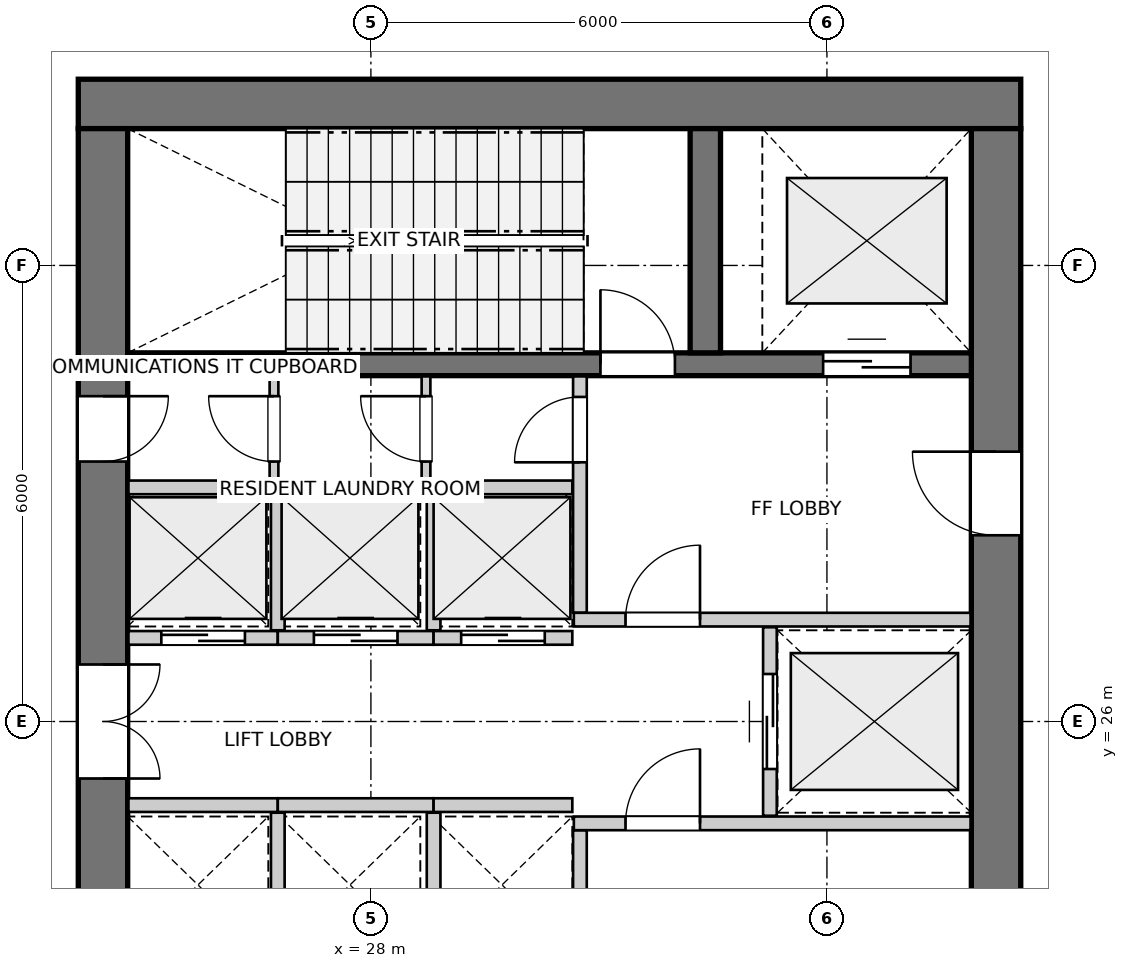
"""IFC4 building model, lengths in metres.
Left out: names, types, materials, properties, quantities, classifications, styles, units other than length and angle.
Written with IfcOpenShell. Run it as: python <this file> out.ifc"""

import sys

from ifc_helpers import new_model, si_unit, direction, frame, frame_2d, origin, place, context, subcontext, project, spatial, rectangle, extrude, source, transform, mapped, element, fill, save


model = new_model("IFC4")
c1 = context("Model", 3, precision=1e-05, world=origin(), true_north=direction((0.0, 1.0)))
c2 = subcontext(c1, "Body", "Model", "MODEL_VIEW")
j1 = project(units=[si_unit("LENGTHUNIT", "METRE"), si_unit("PLANEANGLEUNIT", "RADIAN")], contexts=[c1])
p1 = place(None, origin())
s1 = spatial("IfcSite", under=j1, at=p1, CompositionType="ELEMENT")
p2 = place(p1, origin())
s2 = spatial("IfcBuilding", under=s1, at=p2, CompositionType="ELEMENT")
p3 = place(p2, frame((0.0, 0.0, 128.0)))
s3 = spatial("IfcBuildingStorey", under=s2, at=p3, CompositionType="ELEMENT", Elevation=128.0)
p4 = place(p3, frame((36.55, 34.125, 0.0), z_axis=(0.0, 0.0, 1.0), x_axis=(-1.0, 0.0, 0.0)))
e1 = element("IfcWall", 1, at=p4, inside=s3, PredefinedType="SHEAR", context=c2, shape_type="SweptSolid", body=[
    extrude(rectangle(XDim=12.4, YDim=0.65, at=frame_2d((6.2, 0.0))), origin(), (0.0, 0.0, 1.0), 4.75),
])
p5 = place(p3, frame((24.475, 33.8, 0.0), z_axis=(0.0, 0.0, 1.0), x_axis=(0.0, -1.0, 0.0)))
e2 = element("IfcWall", 2, at=p5, inside=s3, PredefinedType="SHEAR", context=c2, shape_type="SweptSolid", body=[
    extrude(rectangle(XDim=15.6, YDim=0.65, at=frame_2d((7.8, 0.0))), origin(), (0.0, 0.0, 1.0), 4.75),
])
p6 = place(p5, frame((7.05, 0.0, 0.0)))
e3 = element("IfcOpeningElement", 3, at=p6, cuts=e2, PredefinedType="OPENING", context=c2, shape_type="SweptSolid", body=[
    extrude(rectangle(XDim=1.5, YDim=2.15, at=frame_2d((0.75, 1.075))), frame((0.0, 0.335, 0.0), z_axis=(0.0, -1.0, 0.0), x_axis=(1.0, 0.0, 0.0)), (0.0, 0.0, 1.0), 0.67),
])
p7 = place(p5, frame((3.52, 0.0, 0.0)))
e4 = element("IfcOpeningElement", 4, at=p7, cuts=e2, PredefinedType="OPENING", context=c2, shape_type="SweptSolid", body=[
    extrude(rectangle(XDim=0.86, YDim=2.05, at=frame_2d((0.43, 1.025))), frame((0.0, 0.335, 0.0), z_axis=(0.0, -1.0, 0.0), x_axis=(1.0, 0.0, 0.0)), (0.0, 0.0, 1.0), 0.67),
])
p8 = place(p5, frame((11.22, 0.0, 0.0)))
e5 = element("IfcOpeningElement", 5, at=p8, cuts=e2, PredefinedType="OPENING", context=c2, shape_type="SweptSolid", body=[
    extrude(rectangle(XDim=0.86, YDim=2.05, at=frame_2d((0.43, 1.025))), frame((0.0, 0.335, 0.0), z_axis=(0.0, -1.0, 0.0), x_axis=(1.0, 0.0, 0.0)), (0.0, 0.0, 1.0), 0.67),
])
p9 = place(p3, frame((36.225, 18.2, 0.0), z_axis=(0.0, 0.0, 1.0), x_axis=(0.0, 1.0, 0.0)))
e6 = element("IfcWall", 6, at=p9, inside=s3, PredefinedType="SHEAR", context=c2, shape_type="SweptSolid", body=[
    extrude(rectangle(XDim=15.6, YDim=0.65, at=frame_2d((7.8, 0.0))), origin(), (0.0, 0.0, 1.0), 4.75),
])
p10 = place(p9, frame((4.25, 0.0, 0.0)))
e7 = element("IfcOpeningElement", 7, at=p10, cuts=e6, PredefinedType="OPENING", context=c2, shape_type="SweptSolid", body=[
    extrude(rectangle(XDim=1.1, YDim=2.15, at=frame_2d((0.55, 1.075))), frame((0.0, 0.335, 0.0), z_axis=(0.0, -1.0, 0.0), x_axis=(1.0, 0.0, 0.0)), (0.0, 0.0, 1.0), 0.67),
])
p11 = place(p9, frame((10.25, 0.0, 0.0)))
e8 = element("IfcOpeningElement", 8, at=p11, cuts=e6, PredefinedType="OPENING", context=c2, shape_type="SweptSolid", body=[
    extrude(rectangle(XDim=1.1, YDim=2.15, at=frame_2d((0.55, 1.075))), frame((0.0, 0.335, 0.0), z_axis=(0.0, -1.0, 0.0), x_axis=(1.0, 0.0, 0.0)), (0.0, 0.0, 1.0), 0.67),
])
p12 = place(p3, frame((24.8, 30.7, 0.0), z_axis=(0.0, 0.0, 1.0), x_axis=(1.0, 0.0, 0.0)))
e9 = element("IfcWall", 9, at=p12, inside=s3, PredefinedType="SHEAR", context=c2, shape_type="SweptSolid", body=[
    extrude(rectangle(XDim=11.1, YDim=0.3, at=frame_2d((5.55, 0.0))), origin(), (0.0, 0.0, 1.0), 4.75),
])
p13 = place(p12, frame((6.22, 0.0, 0.0)))
e10 = element("IfcOpeningElement", 10, at=p13, cuts=e9, PredefinedType="OPENING", context=c2, shape_type="SweptSolid", body=[
    extrude(rectangle(XDim=0.98, YDim=2.15, at=frame_2d((0.49, 1.075))), frame((0.0, 0.16, 0.0), z_axis=(0.0, -1.0, 0.0), x_axis=(1.0, 0.0, 0.0)), (0.0, 0.0, 1.0), 0.32),
])
p14 = place(p12, frame((9.15, 0.0, 0.0)))
e11 = element("IfcOpeningElement", 11, at=p14, cuts=e9, PredefinedType="OPENING", context=c2, shape_type="SweptSolid", body=[
    extrude(rectangle(XDim=1.15, YDim=2.15, at=frame_2d((0.575, 1.075))), frame((0.0, 0.16, 0.0), z_axis=(0.0, -1.0, 0.0), x_axis=(1.0, 0.0, 0.0)), (0.0, 0.0, 1.0), 0.32),
])
p15 = place(p3, frame((32.4, 30.85, 0.0), z_axis=(0.0, 0.0, 1.0), x_axis=(0.0, 1.0, 0.0)))
e12 = element("IfcWall", 12, at=p15, inside=s3, PredefinedType="SHEAR", context=c2, shape_type="SweptSolid", body=[
    extrude(rectangle(XDim=2.95, YDim=0.4, at=frame_2d((1.475, 0.0))), origin(), (0.0, 0.0, 1.0), 4.75),
])
p16 = place(p3, frame((30.75, 21.46, 0.0), z_axis=(0.0, 0.0, 1.0), x_axis=(0.0, 1.0, 0.0)))
e13 = element("IfcWall", 13, at=p16, inside=s3, PredefinedType="PARTITIONING", context=c2, shape_type="SweptSolid", body=[
    extrude(rectangle(XDim=3.11, YDim=0.18, at=frame_2d((1.555, 0.0))), origin(), (0.0, 0.0, 1.0), 4.75),
])
p17 = place(p16, frame((0.26, 0.0, 0.0)))
e14 = element("IfcOpeningElement", 14, at=p17, cuts=e13, PredefinedType="OPENING", context=c2, shape_type="SweptSolid", body=[
    extrude(rectangle(XDim=0.86, YDim=2.05, at=frame_2d((0.43, 1.025))), frame((0.0, 0.1, 0.0), z_axis=(0.0, -1.0, 0.0), x_axis=(1.0, 0.0, 0.0)), (0.0, 0.0, 1.0), 0.2),
])
p18 = place(p3, frame((30.67, 24.66, 0.0), z_axis=(0.0, 0.0, 1.0), x_axis=(1.0, 0.0, 0.0)))
e15 = element("IfcWall", 15, at=p18, inside=s3, PredefinedType="PARTITIONING", context=c2, shape_type="SweptSolid", body=[
    extrude(rectangle(XDim=5.22, YDim=0.18, at=frame_2d((2.61, 0.0))), origin(), (0.0, 0.0, 1.0), 4.75),
])
p19 = place(p18, frame((0.68, 0.0, 0.0)))
e16 = element("IfcOpeningElement", 16, at=p19, cuts=e15, PredefinedType="OPENING", context=c2, shape_type="SweptSolid", body=[
    extrude(rectangle(XDim=0.98, YDim=2.15, at=frame_2d((0.49, 1.075))), frame((0.0, 0.1, 0.0), z_axis=(0.0, -1.0, 0.0), x_axis=(1.0, 0.0, 0.0)), (0.0, 0.0, 1.0), 0.2),
])
p20 = place(p3, frame((30.75, 27.43, 0.0), z_axis=(0.0, 0.0, 1.0), x_axis=(0.0, 1.0, 0.0)))
e17 = element("IfcWall", 17, at=p20, inside=s3, PredefinedType="PARTITIONING", context=c2, shape_type="SweptSolid", body=[
    extrude(rectangle(XDim=3.11, YDim=0.18, at=frame_2d((1.555, 0.0))), origin(), (0.0, 0.0, 1.0), 4.75),
])
p21 = place(p20, frame((1.98, 0.0, 0.0)))
e18 = element("IfcOpeningElement", 18, at=p21, cuts=e17, PredefinedType="OPENING", context=c2, shape_type="SweptSolid", body=[
    extrude(rectangle(XDim=0.86, YDim=2.05, at=frame_2d((0.43, 1.025))), frame((0.0, 0.1, 0.0), z_axis=(0.0, -1.0, 0.0), x_axis=(1.0, 0.0, 0.0)), (0.0, 0.0, 1.0), 0.2),
])
p22 = place(p3, frame((30.67, 27.34, 0.0), z_axis=(0.0, 0.0, 1.0), x_axis=(1.0, 0.0, 0.0)))
e19 = element("IfcWall", 19, at=p22, inside=s3, PredefinedType="PARTITIONING", context=c2, shape_type="SweptSolid", body=[
    extrude(rectangle(XDim=5.22, YDim=0.18, at=frame_2d((2.61, 0.0))), origin(), (0.0, 0.0, 1.0), 4.75),
])
p23 = place(p22, frame((0.68, 0.0, 0.0)))
e20 = element("IfcOpeningElement", 20, at=p23, cuts=e19, PredefinedType="OPENING", context=c2, shape_type="SweptSolid", body=[
    extrude(rectangle(XDim=0.98, YDim=2.15, at=frame_2d((0.49, 1.075))), frame((0.0, 0.1, 0.0), z_axis=(0.0, -1.0, 0.0), x_axis=(1.0, 0.0, 0.0)), (0.0, 0.0, 1.0), 0.2),
])
p24 = place(p3, frame((33.25, 24.76, 0.0), z_axis=(0.0, 0.0, 1.0), x_axis=(0.0, 1.0, 0.0)))
e21 = element("IfcWall", 21, at=p24, inside=s3, PredefinedType="PARTITIONING", context=c2, shape_type="SweptSolid", body=[
    extrude(rectangle(XDim=2.48, YDim=0.18, at=frame_2d((1.24, 0.0))), origin(), (0.0, 0.0, 1.0), 4.75),
])
p25 = place(p24, frame((0.615, 0.0, 0.0)))
e22 = element("IfcOpeningElement", 22, at=p25, cuts=e21, PredefinedType="OPENING", context=c2, shape_type="SweptSolid", body=[
    extrude(rectangle(XDim=1.25, YDim=2.15, at=frame_2d((0.625, 1.075))), frame((0.0, 0.1, 0.0), z_axis=(0.0, -1.0, 0.0), x_axis=(1.0, 0.0, 0.0)), (0.0, 0.0, 1.0), 0.2),
])
p26 = place(p3, frame((24.81, 24.9, 0.0), z_axis=(0.0, 0.0, 1.0), x_axis=(1.0, 0.0, 0.0)))
e23 = element("IfcWall", 23, at=p26, inside=s3, PredefinedType="PARTITIONING", context=c2, shape_type="SweptSolid", body=[
    extrude(rectangle(XDim=1.965, YDim=0.18, at=frame_2d((0.982, 0.0))), origin(), (0.0, 0.0, 1.0), 4.75),
])
p27 = place(p3, frame((26.775, 24.9, 0.0), z_axis=(0.0, 0.0, 1.0), x_axis=(1.0, 0.0, 0.0)))
e24 = element("IfcWall", 24, at=p27, inside=s3, PredefinedType="PARTITIONING", context=c2, shape_type="SweptSolid", body=[
    extrude(rectangle(XDim=2.05, YDim=0.18, at=frame_2d((1.025, 0.0))), origin(), (0.0, 0.0, 1.0), 4.75),
])
p28 = place(p3, frame((26.775, 23.02, 0.0), z_axis=(0.0, 0.0, 1.0), x_axis=(0.0, 1.0, 0.0)))
e25 = element("IfcWall", 25, at=p28, inside=s3, PredefinedType="PARTITIONING", context=c2, shape_type="SweptSolid", body=[
    extrude(rectangle(XDim=1.78, YDim=0.18, at=frame_2d((0.89, 0.0))), origin(), (0.0, 0.0, 1.0), 4.75),
])
p29 = place(p3, frame((28.825, 24.9, 0.0), z_axis=(0.0, 0.0, 1.0), x_axis=(1.0, 0.0, 0.0)))
e26 = element("IfcWall", 26, at=p29, inside=s3, PredefinedType="PARTITIONING", context=c2, shape_type="SweptSolid", body=[
    extrude(rectangle(XDim=1.825, YDim=0.18, at=frame_2d((0.913, 0.0))), origin(), (0.0, 0.0, 1.0), 4.75),
])
p30 = place(p3, frame((28.825, 23.02, 0.0), z_axis=(0.0, 0.0, 1.0), x_axis=(0.0, 1.0, 0.0)))
e27 = element("IfcWall", 27, at=p30, inside=s3, PredefinedType="PARTITIONING", context=c2, shape_type="SweptSolid", body=[
    extrude(rectangle(XDim=1.78, YDim=0.18, at=frame_2d((0.89, 0.0))), origin(), (0.0, 0.0, 1.0), 4.75),
])
p31 = place(p3, frame((24.81, 29.08, 0.0), z_axis=(0.0, 0.0, 1.0), x_axis=(1.0, 0.0, 0.0)))
e28 = element("IfcWall", 28, at=p31, inside=s3, PredefinedType="PARTITIONING", context=c2, shape_type="SweptSolid", body=[
    extrude(rectangle(XDim=5.84, YDim=0.18, at=frame_2d((2.92, 0.0))), origin(), (0.0, 0.0, 1.0), 4.75),
])
p32 = place(p3, frame((24.81, 27.1, 0.0), z_axis=(0.0, 0.0, 1.0), x_axis=(1.0, 0.0, 0.0)))
e29 = element("IfcWall", 29, at=p32, inside=s3, PredefinedType="PARTITIONING", context=c2, shape_type="SweptSolid", body=[
    extrude(rectangle(XDim=1.965, YDim=0.18, at=frame_2d((0.982, 0.0))), origin(), (0.0, 0.0, 1.0), 4.75),
])
p33 = place(p32, frame((0.433, 0.0, 0.0)))
e30 = element("IfcOpeningElement", 30, at=p33, cuts=e29, PredefinedType="OPENING", context=c2, shape_type="SweptSolid", body=[
    extrude(rectangle(XDim=1.1, YDim=2.15, at=frame_2d((0.55, 1.075))), frame((0.0, 0.1, 0.0), z_axis=(0.0, -1.0, 0.0), x_axis=(1.0, 0.0, 0.0)), (0.0, 0.0, 1.0), 0.2),
])
p34 = place(p3, frame((26.775, 27.1, 0.0), z_axis=(0.0, 0.0, 1.0), x_axis=(1.0, 0.0, 0.0)))
e31 = element("IfcWall", 31, at=p34, inside=s3, PredefinedType="PARTITIONING", context=c2, shape_type="SweptSolid", body=[
    extrude(rectangle(XDim=2.05, YDim=0.18, at=frame_2d((1.025, 0.0))), origin(), (0.0, 0.0, 1.0), 4.75),
])
p35 = place(p34, frame((0.475, 0.0, 0.0)))
e32 = element("IfcOpeningElement", 32, at=p35, cuts=e31, PredefinedType="OPENING", context=c2, shape_type="SweptSolid", body=[
    extrude(rectangle(XDim=1.1, YDim=2.15, at=frame_2d((0.55, 1.075))), frame((0.0, 0.1, 0.0), z_axis=(0.0, -1.0, 0.0), x_axis=(1.0, 0.0, 0.0)), (0.0, 0.0, 1.0), 0.2),
])
p36 = place(p3, frame((26.775, 27.2, 0.0), z_axis=(0.0, 0.0, 1.0), x_axis=(0.0, 1.0, 0.0)))
e33 = element("IfcWall", 33, at=p36, inside=s3, PredefinedType="PARTITIONING", context=c2, shape_type="SweptSolid", body=[
    extrude(rectangle(XDim=1.78, YDim=0.18, at=frame_2d((0.89, 0.0))), origin(), (0.0, 0.0, 1.0), 4.75),
])
p37 = place(p3, frame((28.825, 27.1, 0.0), z_axis=(0.0, 0.0, 1.0), x_axis=(1.0, 0.0, 0.0)))
e34 = element("IfcWall", 34, at=p37, inside=s3, PredefinedType="PARTITIONING", context=c2, shape_type="SweptSolid", body=[
    extrude(rectangle(XDim=1.825, YDim=0.18, at=frame_2d((0.913, 0.0))), origin(), (0.0, 0.0, 1.0), 4.75),
])
p38 = place(p37, frame((0.363, 0.0, 0.0)))
e35 = element("IfcOpeningElement", 35, at=p38, cuts=e34, PredefinedType="OPENING", context=c2, shape_type="SweptSolid", body=[
    extrude(rectangle(XDim=1.1, YDim=2.15, at=frame_2d((0.55, 1.075))), frame((0.0, 0.1, 0.0), z_axis=(0.0, -1.0, 0.0), x_axis=(1.0, 0.0, 0.0)), (0.0, 0.0, 1.0), 0.2),
])
p39 = place(p3, frame((28.825, 27.2, 0.0), z_axis=(0.0, 0.0, 1.0), x_axis=(0.0, 1.0, 0.0)))
e36 = element("IfcWall", 36, at=p39, inside=s3, PredefinedType="PARTITIONING", context=c2, shape_type="SweptSolid", body=[
    extrude(rectangle(XDim=1.78, YDim=0.18, at=frame_2d((0.89, 0.0))), origin(), (0.0, 0.0, 1.0), 4.75),
])
p40 = place(p3, frame((26.725, 29.16, 0.0), z_axis=(0.0, 0.0, 1.0), x_axis=(0.0, 1.0, 0.0)))
e37 = element("IfcWall", 37, at=p40, inside=s3, PredefinedType="PARTITIONING", context=c2, shape_type="SweptSolid", body=[
    extrude(rectangle(XDim=1.38, YDim=0.115, at=frame_2d((0.69, 0.0))), origin(), (0.0, 0.0, 1.0), 4.75),
])
p41 = place(p40, frame((0.26, 0.0, 0.0)))
e38 = element("IfcOpeningElement", 38, at=p41, cuts=e37, PredefinedType="OPENING", context=c2, shape_type="SweptSolid", body=[
    extrude(rectangle(XDim=0.86, YDim=2.05, at=frame_2d((0.43, 1.025))), frame((0.0, 0.067, 0.0), z_axis=(0.0, -1.0, 0.0), x_axis=(1.0, 0.0, 0.0)), (0.0, 0.0, 1.0), 0.135),
])
p42 = place(p3, frame((28.725, 29.16, 0.0), z_axis=(0.0, 0.0, 1.0), x_axis=(0.0, 1.0, 0.0)))
e39 = element("IfcWall", 39, at=p42, inside=s3, PredefinedType="PARTITIONING", context=c2, shape_type="SweptSolid", body=[
    extrude(rectangle(XDim=1.38, YDim=0.115, at=frame_2d((0.69, 0.0))), origin(), (0.0, 0.0, 1.0), 4.75),
])
p43 = place(p42, frame((0.26, 0.0, 0.0)))
e40 = element("IfcOpeningElement", 40, at=p43, cuts=e39, PredefinedType="OPENING", context=c2, shape_type="SweptSolid", body=[
    extrude(rectangle(XDim=0.86, YDim=2.05, at=frame_2d((0.43, 1.025))), frame((0.0, 0.067, 0.0), z_axis=(0.0, -1.0, 0.0), x_axis=(1.0, 0.0, 0.0)), (0.0, 0.0, 1.0), 0.135),
])
m1 = source(origin(), c2, "Body", "SweptSolid", [
    extrude(rectangle(XDim=0.98, YDim=2.15, at=frame_2d((0.49, 1.075))), frame((0.0, 0.025, 0.0), z_axis=(0.0, -1.0, 0.0), x_axis=(1.0, 0.0, 0.0)), (0.0, 0.0, 1.0), 0.05),
])
p44 = place(p13, origin())
e41 = element("IfcDoor", 41, at=p44, inside=s3, OperationType="SINGLE_SWING_LEFT", PredefinedType="DOOR", context=c2, shape_type="MappedRepresentation", body=[
    mapped(m1, transform((0.0, 0.0, 0.0), x_axis=(1.0, 0.0, 0.0), y_axis=(0.0, 1.0, 0.0), z_axis=(0.0, 0.0, 1.0), scale=1.0)),
])
fill(e10, e41)
m2 = source(origin(), c2, "Body", "SweptSolid", [
    extrude(rectangle(XDim=1.15, YDim=2.15, at=frame_2d((0.575, 1.075))), frame((0.0, 0.025, 0.0), z_axis=(0.0, -1.0, 0.0), x_axis=(1.0, 0.0, 0.0)), (0.0, 0.0, 1.0), 0.05),
])
p45 = place(p14, origin())
e42 = element("IfcDoor", 42, at=p45, inside=s3, OperationType="DOUBLE_DOOR_SLIDING", PredefinedType="DOOR", context=c2, shape_type="MappedRepresentation", body=[
    mapped(m2, transform((0.0, 0.0, 0.0), x_axis=(1.0, 0.0, 0.0), y_axis=(0.0, 1.0, 0.0), z_axis=(0.0, 0.0, 1.0), scale=1.0)),
])
fill(e11, e42)
m3 = source(origin(), c2, "Body", "SweptSolid", [
    extrude(rectangle(XDim=1.1, YDim=2.15, at=frame_2d((0.55, 1.075))), frame((0.0, 0.025, 0.0), z_axis=(0.0, -1.0, 0.0), x_axis=(1.0, 0.0, 0.0)), (0.0, 0.0, 1.0), 0.05),
])
p46 = place(p11, origin())
e43 = element("IfcDoor", 43, at=p46, inside=s3, OperationType="SINGLE_SWING_RIGHT", PredefinedType="DOOR", context=c2, shape_type="MappedRepresentation", body=[
    mapped(m3, transform((0.0, 0.0, 0.0), x_axis=(1.0, 0.0, 0.0), y_axis=(0.0, 1.0, 0.0), z_axis=(0.0, 0.0, 1.0), scale=1.0)),
])
fill(e8, e43)
m4 = source(origin(), c2, "Body", "SweptSolid", [
    extrude(rectangle(XDim=1.5, YDim=2.15, at=frame_2d((0.75, 1.075))), frame((0.0, 0.025, 0.0), z_axis=(0.0, -1.0, 0.0), x_axis=(1.0, 0.0, 0.0)), (0.0, 0.0, 1.0), 0.05),
])
p47 = place(p6, origin())
e44 = element("IfcDoor", 44, at=p47, inside=s3, OperationType="DOUBLE_DOOR_SINGLE_SWING", PredefinedType="DOOR", context=c2, shape_type="MappedRepresentation", body=[
    mapped(m4, transform((0.0, 0.0, 0.0), x_axis=(1.0, 0.0, 0.0), y_axis=(0.0, 1.0, 0.0), z_axis=(0.0, 0.0, 1.0), scale=1.0)),
])
fill(e3, e44)
m5 = source(origin(), c2, "Body", "SweptSolid", [
    extrude(rectangle(XDim=0.86, YDim=2.05, at=frame_2d((0.43, 1.025))), frame((0.0, 0.025, 0.0), z_axis=(0.0, -1.0, 0.0), x_axis=(1.0, 0.0, 0.0)), (0.0, 0.0, 1.0), 0.05),
])
p48 = place(p7, origin())
e45 = element("IfcDoor", 45, at=p48, inside=s3, OperationType="SINGLE_SWING_LEFT", PredefinedType="DOOR", context=c2, shape_type="MappedRepresentation", body=[
    mapped(m5, transform((0.0, 0.0, 0.0), x_axis=(1.0, 0.0, 0.0), y_axis=(0.0, 1.0, 0.0), z_axis=(0.0, 0.0, 1.0), scale=1.0)),
])
fill(e4, e45)
p49 = place(p19, origin())
e46 = element("IfcDoor", 46, at=p49, inside=s3, OperationType="SINGLE_SWING_RIGHT", PredefinedType="DOOR", context=c2, shape_type="MappedRepresentation", body=[
    mapped(m1, transform((0.0, 0.0, 0.0), x_axis=(1.0, 0.0, 0.0), y_axis=(0.0, 1.0, 0.0), z_axis=(0.0, 0.0, 1.0), scale=1.0)),
])
fill(e16, e46)
p50 = place(p21, origin())
e47 = element("IfcDoor", 47, at=p50, inside=s3, OperationType="SINGLE_SWING_LEFT", PredefinedType="DOOR", context=c2, shape_type="MappedRepresentation", body=[
    mapped(m5, transform((0.0, 0.0, 0.0), x_axis=(1.0, 0.0, 0.0), y_axis=(0.0, 1.0, 0.0), z_axis=(0.0, 0.0, 1.0), scale=1.0)),
])
fill(e18, e47)
p51 = place(p23, origin())
e48 = element("IfcDoor", 48, at=p51, inside=s3, OperationType="SINGLE_SWING_RIGHT", PredefinedType="DOOR", context=c2, shape_type="MappedRepresentation", body=[
    mapped(m1, transform((0.0, 0.0, 0.0), x_axis=(1.0, 0.0, 0.0), y_axis=(0.0, 1.0, 0.0), z_axis=(0.0, 0.0, 1.0), scale=1.0)),
])
fill(e20, e48)
m6 = source(origin(), c2, "Body", "SweptSolid", [
    extrude(rectangle(XDim=1.25, YDim=2.15, at=frame_2d((0.625, 1.075))), frame((0.0, 0.025, 0.0), z_axis=(0.0, -1.0, 0.0), x_axis=(1.0, 0.0, 0.0)), (0.0, 0.0, 1.0), 0.05),
])
p52 = place(p25, origin())
e49 = element("IfcDoor", 49, at=p52, inside=s3, OperationType="DOUBLE_DOOR_SLIDING", PredefinedType="DOOR", context=c2, shape_type="MappedRepresentation", body=[
    mapped(m6, transform((0.0, 0.0, 0.0), x_axis=(1.0, 0.0, 0.0), y_axis=(0.0, 1.0, 0.0), z_axis=(0.0, 0.0, 1.0), scale=1.0)),
])
fill(e22, e49)
p53 = place(p33, origin())
e50 = element("IfcDoor", 50, at=p53, inside=s3, OperationType="DOUBLE_DOOR_SLIDING", PredefinedType="DOOR", context=c2, shape_type="MappedRepresentation", body=[
    mapped(m3, transform((0.0, 0.0, 0.0), x_axis=(1.0, 0.0, 0.0), y_axis=(0.0, 1.0, 0.0), z_axis=(0.0, 0.0, 1.0), scale=1.0)),
])
fill(e30, e50)
p54 = place(p35, origin())
e51 = element("IfcDoor", 51, at=p54, inside=s3, OperationType="DOUBLE_DOOR_SLIDING", PredefinedType="DOOR", context=c2, shape_type="MappedRepresentation", body=[
    mapped(m3, transform((0.0, 0.0, 0.0), x_axis=(1.0, 0.0, 0.0), y_axis=(0.0, 1.0, 0.0), z_axis=(0.0, 0.0, 1.0), scale=1.0)),
])
fill(e32, e51)
p55 = place(p38, origin())
e52 = element("IfcDoor", 52, at=p55, inside=s3, OperationType="DOUBLE_DOOR_SLIDING", PredefinedType="DOOR", context=c2, shape_type="MappedRepresentation", body=[
    mapped(m3, transform((0.0, 0.0, 0.0), x_axis=(1.0, 0.0, 0.0), y_axis=(0.0, 1.0, 0.0), z_axis=(0.0, 0.0, 1.0), scale=1.0)),
])
fill(e35, e52)
p56 = place(p41, origin())
e53 = element("IfcDoor", 53, at=p56, inside=s3, OperationType="SINGLE_SWING_RIGHT", PredefinedType="DOOR", context=c2, shape_type="MappedRepresentation", body=[
    mapped(m5, transform((0.0, 0.0, 0.0), x_axis=(1.0, 0.0, 0.0), y_axis=(0.0, 1.0, 0.0), z_axis=(0.0, 0.0, 1.0), scale=1.0)),
])
fill(e38, e53)
p57 = place(p43, origin())
e54 = element("IfcDoor", 54, at=p57, inside=s3, OperationType="SINGLE_SWING_RIGHT", PredefinedType="DOOR", context=c2, shape_type="MappedRepresentation", body=[
    mapped(m5, transform((0.0, 0.0, 0.0), x_axis=(1.0, 0.0, 0.0), y_axis=(0.0, 1.0, 0.0), z_axis=(0.0, 0.0, 1.0), scale=1.0)),
])
fill(e40, e54)
save(model, sys.argv[1])
